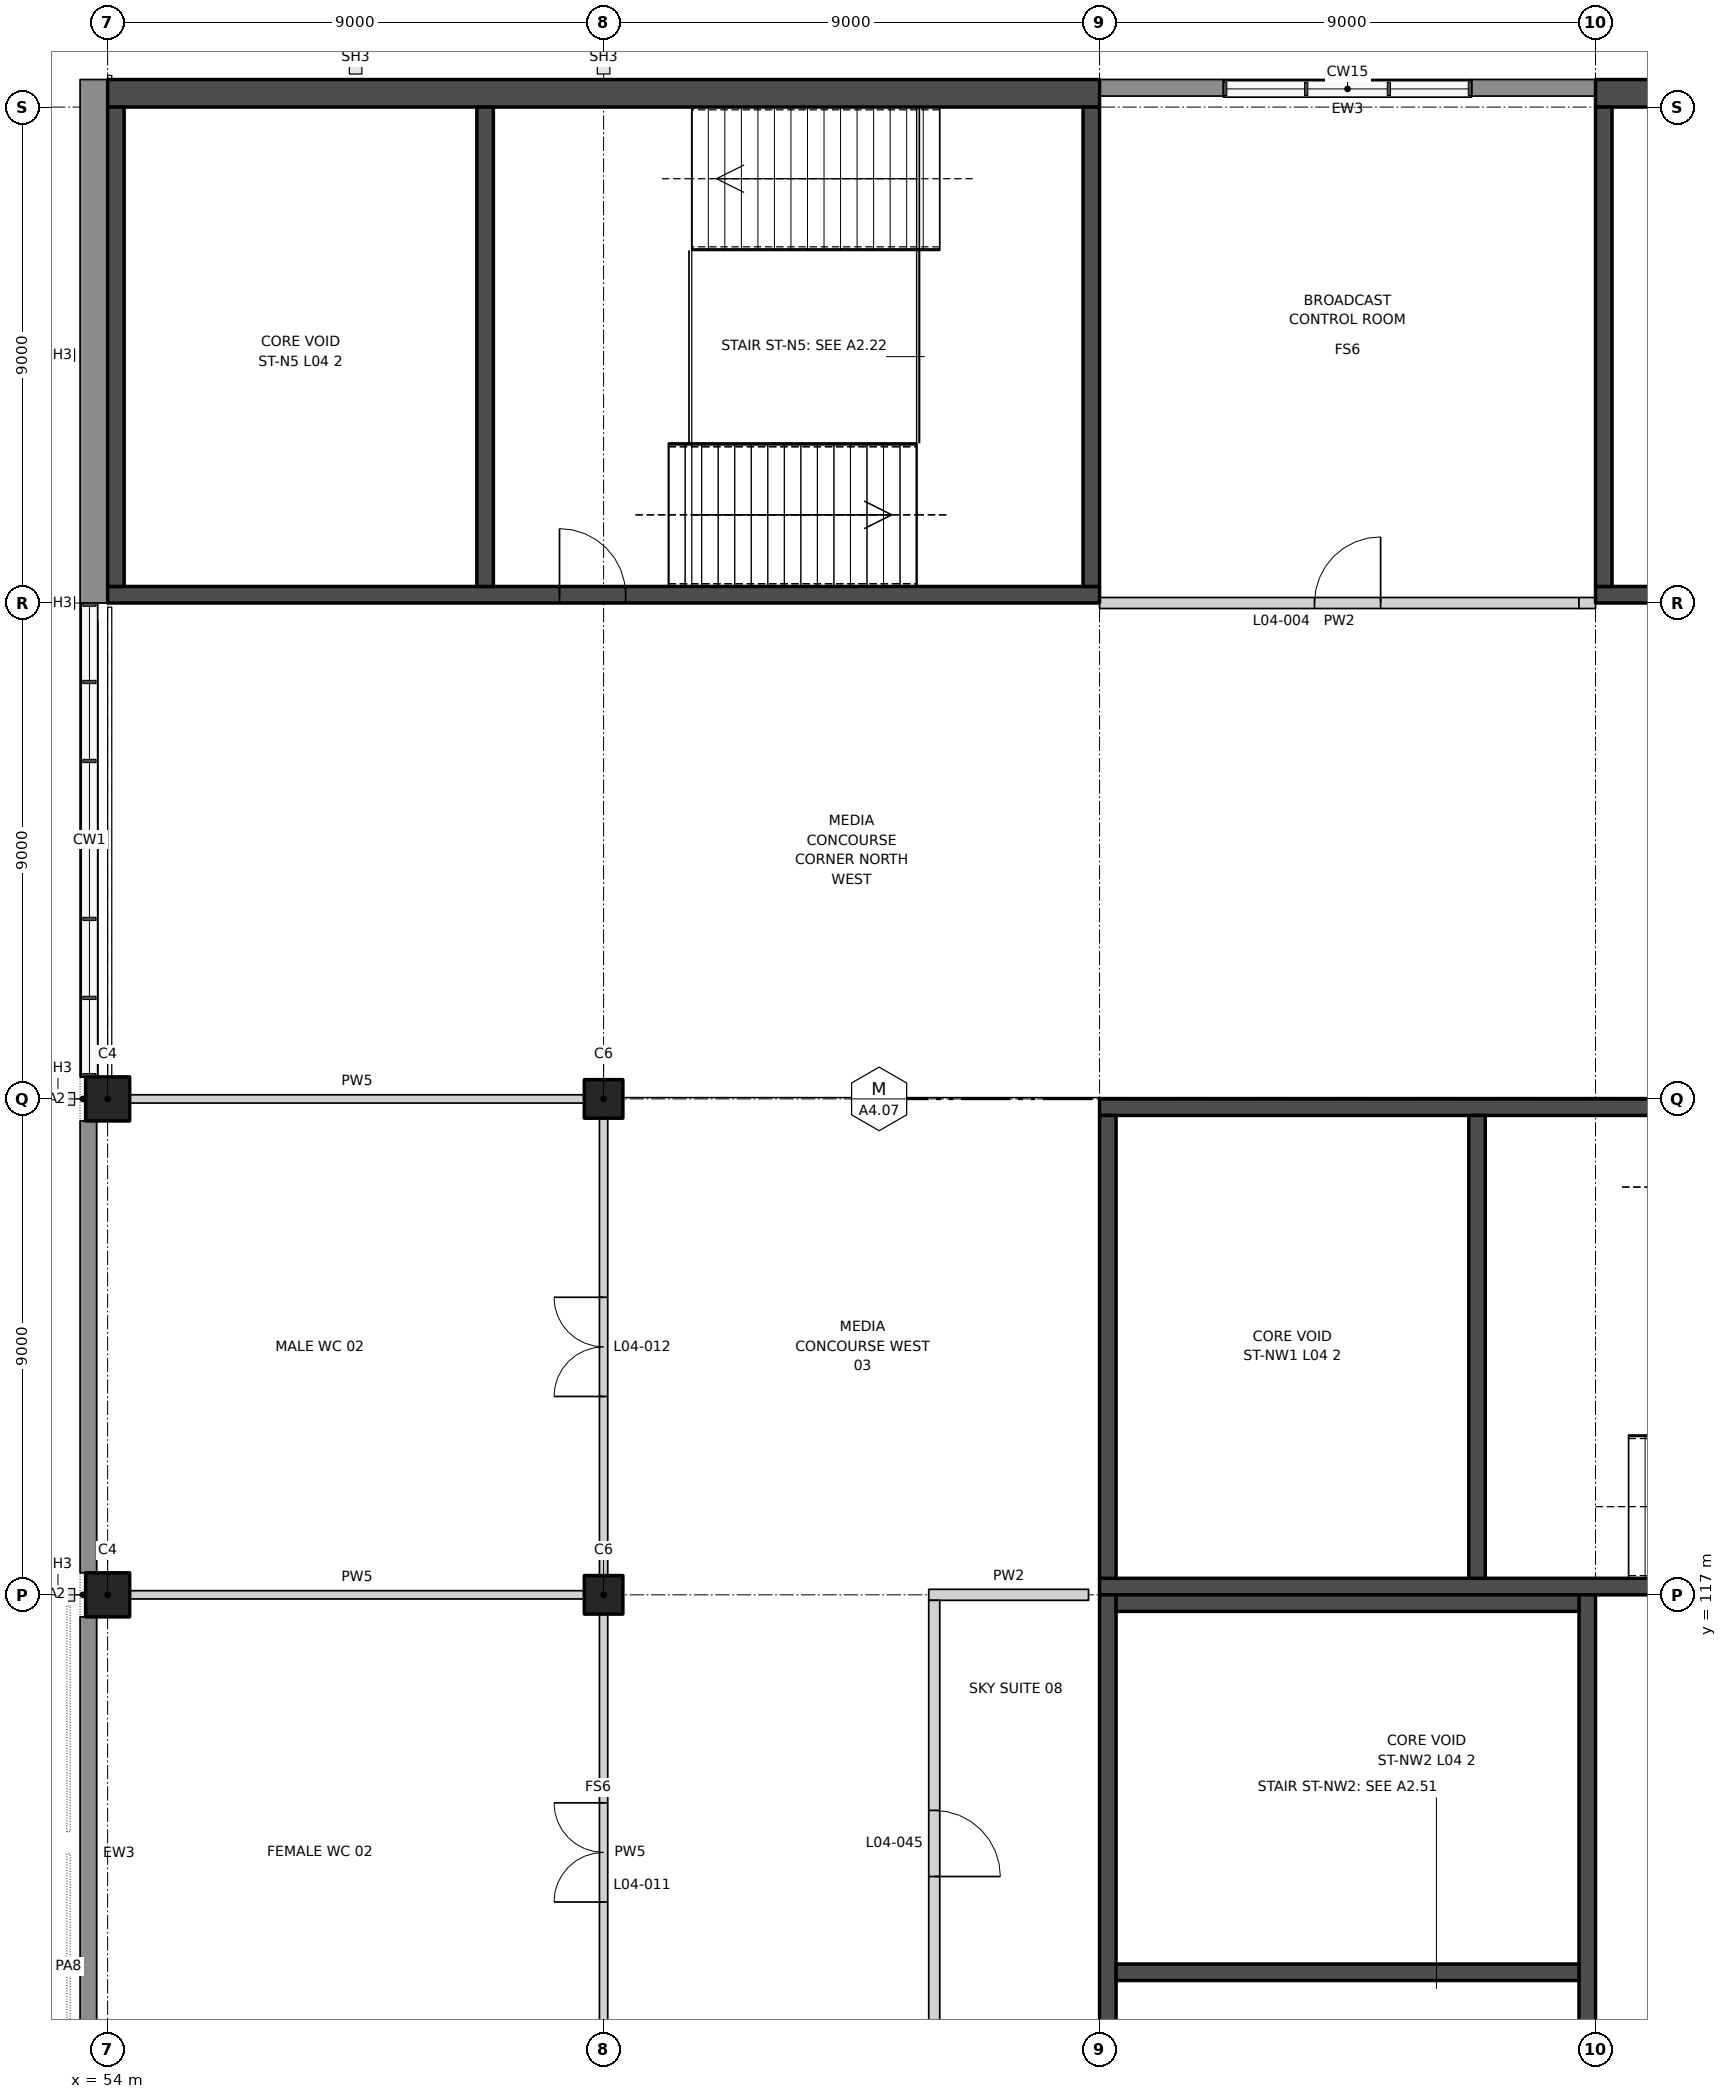
"""IFC4 building model, lengths in metres.
Left out: names, types, materials, properties, quantities, classifications, styles, units other than length and angle.
Written with IfcOpenShell. Run it as: python <this file> out.ifc"""

import sys

from ifc_helpers import new_model, si_unit, direction, frame, frame_2d, origin, origin_2d, place, context, subcontext, project, spatial, rectangle, extrude, element, fill, save


model = new_model("IFC4")
c1 = context("Model", 3, precision=1e-05, world=origin(), true_north=direction((0.0, 1.0)))
c2 = subcontext(c1, "Body", "Model", "MODEL_VIEW")
j1 = project(units=[si_unit("LENGTHUNIT", "METRE"), si_unit("PLANEANGLEUNIT", "RADIAN")], contexts=[c1])
p1 = place(None, origin())
s1 = spatial("IfcSite", under=j1, at=p1, CompositionType="ELEMENT")
p2 = place(p1, origin())
s2 = spatial("IfcBuilding", under=s1, at=p2, CompositionType="ELEMENT")
p3 = place(p2, frame((0.0, 0.0, 28.0)))
s3 = spatial("IfcBuildingStorey", under=s2, at=p3, CompositionType="ELEMENT", Elevation=28.0)
for number, where, z_axis, x_axis in (
    (1, (54.0, 117.0, 0.0), (0.0, 0.0, 1.0), (1.0, 0.0, 0.0)),
    (2, (54.0, 126.0, 0.0), (0.0, 0.0, 1.0), (1.0, 0.0, 0.0)),
):
    element("IfcColumn", number, at=place(p3, frame(where, z_axis=z_axis, x_axis=x_axis)), inside=s3, PredefinedType="COLUMN", context=c2, shape_type="SweptSolid", body=[
        extrude(rectangle(XDim=0.8, YDim=0.8, at=origin_2d()), origin(), (0.0, 0.0, 1.0), 5.5),
    ])
for number, where, z_axis, x_axis in (
    (3, (63.0, 117.0, 0.0), (0.0, 0.0, 1.0), (1.0, 0.0, 0.0)),
    (4, (63.0, 126.0, 0.0), (0.0, 0.0, 1.0), (1.0, 0.0, 0.0)),
):
    element("IfcColumn", number, at=place(p3, frame(where, z_axis=z_axis, x_axis=x_axis)), inside=s3, PredefinedType="COLUMN", context=c2, shape_type="SweptSolid", body=[
        extrude(rectangle(XDim=0.7, YDim=0.7, at=origin_2d()), origin(), (0.0, 0.0, 1.0), 5.5),
    ])
p4 = place(p3, frame((54.4, 117.0, 0.0), z_axis=(0.0, 0.0, 1.0), x_axis=(1.0, 0.0, 0.0)))
e5 = element("IfcWall", 5, at=p4, inside=s3, PredefinedType="PARTITIONING", context=c2, shape_type="SweptSolid", body=[
    extrude(rectangle(XDim=8.25, YDim=0.15, at=frame_2d((4.125, 0.0))), origin(), (0.0, 0.0, 1.0), 9.5),
])
p5 = place(p3, frame((68.9, 117.0, 0.0), z_axis=(0.0, 0.0, 1.0), x_axis=(1.0, 0.0, 0.0)))
e6 = element("IfcWall", 6, at=p5, inside=s3, PredefinedType="PARTITIONING", context=c2, shape_type="SweptSolid", body=[
    extrude(rectangle(XDim=2.9, YDim=0.2, at=frame_2d((1.45, 0.0))), origin(), (0.0, 0.0, 1.0), 4.2),
])
p6 = place(p3, frame((54.4, 126.0, 0.0), z_axis=(0.0, 0.0, 1.0), x_axis=(1.0, 0.0, 0.0)))
e7 = element("IfcWall", 7, at=p6, inside=s3, PredefinedType="PARTITIONING", context=c2, shape_type="SweptSolid", body=[
    extrude(rectangle(XDim=8.25, YDim=0.15, at=frame_2d((4.125, 0.0))), origin(), (0.0, 0.0, 1.0), 4.3),
])
p7 = place(p3, frame((72.0, 135.0, 0.0), z_axis=(0.0, 0.0, 1.0), x_axis=(1.0, 0.0, 0.0)))
e8 = element("IfcWall", 8, at=p7, inside=s3, PredefinedType="PARTITIONING", context=c2, shape_type="SweptSolid", body=[
    extrude(rectangle(XDim=8.7, YDim=0.2, at=frame_2d((4.35, 0.0))), origin(), (0.0, 0.0, 1.0), 4.2),
])
p8 = place(p7, frame((3.9, 0.0, 0.0)))
e9 = element("IfcOpeningElement", 9, at=p8, cuts=e8, PredefinedType="OPENING", context=c2, shape_type="SweptSolid", body=[
    extrude(rectangle(XDim=1.2, YDim=2.1, at=frame_2d((0.6, 1.05))), frame((0.0, 0.11, 0.0), z_axis=(0.0, -1.0, 0.0), x_axis=(1.0, 0.0, 0.0)), (0.0, 0.0, 1.0), 0.22),
])
p9 = place(p3, frame((63.0, 108.0, 0.0), z_axis=(0.0, 0.0, 1.0), x_axis=(0.0, 1.0, 0.0)))
e10 = element("IfcWall", 10, at=p9, inside=s3, PredefinedType="PARTITIONING", context=c2, shape_type="SweptSolid", body=[
    extrude(rectangle(XDim=8.65, YDim=0.15, at=frame_2d((4.325, 0.0))), origin(), (0.0, 0.0, 1.0), 4.2),
])
p10 = place(p9, frame((3.425, 0.0, 0.0)))
e11 = element("IfcOpeningElement", 11, at=p10, cuts=e10, PredefinedType="OPENING", context=c2, shape_type="SweptSolid", body=[
    extrude(rectangle(XDim=1.8, YDim=2.1, at=frame_2d((0.9, 1.05))), frame((0.0, 0.085, 0.0), z_axis=(0.0, -1.0, 0.0), x_axis=(1.0, 0.0, 0.0)), (0.0, 0.0, 1.0), 0.17),
])
p11 = place(p3, frame((63.0, 117.35, 0.0), z_axis=(0.0, 0.0, 1.0), x_axis=(0.0, 1.0, 0.0)))
e12 = element("IfcWall", 12, at=p11, inside=s3, PredefinedType="PARTITIONING", context=c2, shape_type="SweptSolid", body=[
    extrude(rectangle(XDim=8.3, YDim=0.15, at=frame_2d((4.15, 0.0))), origin(), (0.0, 0.0, 1.0), 4.2),
])
p12 = place(p11, frame((3.25, 0.0, 0.0)))
e13 = element("IfcOpeningElement", 13, at=p12, cuts=e12, PredefinedType="OPENING", context=c2, shape_type="SweptSolid", body=[
    extrude(rectangle(XDim=1.8, YDim=2.1, at=frame_2d((0.9, 1.05))), frame((0.0, 0.085, 0.0), z_axis=(0.0, -1.0, 0.0), x_axis=(1.0, 0.0, 0.0)), (0.0, 0.0, 1.0), 0.17),
])
p13 = place(p3, frame((69.0, 108.075, 0.0), z_axis=(0.0, 0.0, 1.0), x_axis=(0.0, 1.0, 0.0)))
e14 = element("IfcWall", 14, at=p13, inside=s3, PredefinedType="PARTITIONING", context=c2, shape_type="SweptSolid", body=[
    extrude(rectangle(XDim=8.825, YDim=0.2, at=frame_2d((4.413, 0.0))), origin(), (0.0, 0.0, 1.0), 5.5),
])
p14 = place(p13, frame((3.813, 0.0, 0.0)))
e15 = element("IfcOpeningElement", 15, at=p14, cuts=e14, PredefinedType="OPENING", context=c2, shape_type="SweptSolid", body=[
    extrude(rectangle(XDim=1.2, YDim=2.1, at=frame_2d((0.6, 1.05))), frame((0.0, 0.11, 0.0), z_axis=(0.0, -1.0, 0.0), x_axis=(1.0, 0.0, 0.0)), (0.0, 0.0, 1.0), 0.22),
])
for number, where, z_axis, x_axis in (
    (16, (74.25, 144.35, 0.0), (0.0, 0.0, 1.0), (-1.0, 0.0, 0.0)),
    (17, (81.0, 144.35, 0.0), (0.0, 0.0, 1.0), (-1.0, 0.0, 0.0)),
):
    element("IfcWall", number, at=place(p3, frame(where, z_axis=z_axis, x_axis=x_axis)), inside=s3, PredefinedType="SOLIDWALL", context=c2, shape_type="SweptSolid", body=[
        extrude(rectangle(XDim=2.25, YDim=0.3, at=frame_2d((1.125, 0.0))), origin(), (0.0, 0.0, 1.0), 4.9),
    ])
p15 = place(p3, frame((78.75, 144.35, 0.0), z_axis=(0.0, 0.0, 1.0), x_axis=(-1.0, 0.0, 0.0)))
e18 = element("IfcWall", 18, at=p15, inside=s3, PredefinedType="SOLIDWALL", context=c2, shape_type="SweptSolid", body=[
    extrude(rectangle(XDim=4.5, YDim=0.3, at=frame_2d((2.25, 0.0))), origin(), (0.0, 0.0, 1.0), 1.0),
])
p16 = place(p3, frame((53.65, 116.6, 0.0), z_axis=(0.0, 0.0, 1.0), x_axis=(0.0, -1.0, 0.0)))
e19 = element("IfcWall", 19, at=p16, inside=s3, PredefinedType="SOLIDWALL", context=c2, shape_type="SweptSolid", body=[
    extrude(rectangle(XDim=8.6, YDim=0.3, at=frame_2d((4.3, 0.0))), origin(), (0.0, 0.0, 1.0), 5.5),
])
p17 = place(p3, frame((53.65, 125.6, 0.0), z_axis=(0.0, 0.0, 1.0), x_axis=(0.0, -1.0, 0.0)))
e20 = element("IfcWall", 20, at=p17, inside=s3, PredefinedType="SOLIDWALL", context=c2, shape_type="SweptSolid", body=[
    extrude(rectangle(XDim=8.2, YDim=0.3, at=frame_2d((4.1, 0.0))), origin(), (0.0, 0.0, 1.0), 5.5),
])
p18 = place(p3, frame((53.65, 135.0, 0.0), z_axis=(0.0, 0.0, 1.0), x_axis=(0.0, -1.0, 0.0)))
e21 = element("IfcWall", 21, at=p18, inside=s3, PredefinedType="SOLIDWALL", context=c2, shape_type="SweptSolid", body=[
    extrude(rectangle(XDim=8.6, YDim=0.3, at=frame_2d((4.3, 0.0))), origin(), (0.0, 0.0, 1.0), 1.0),
])
p19 = place(p3, frame((53.75, 144.5, 0.0), z_axis=(0.0, 0.0, 1.0), x_axis=(0.0, -1.0, 0.0)))
e22 = element("IfcWall", 22, at=p19, inside=s3, PredefinedType="SOLIDWALL", context=c2, shape_type="SweptSolid", body=[
    extrude(rectangle(XDim=9.5, YDim=0.5, at=frame_2d((4.75, 0.0))), origin(), (0.0, 0.0, 1.0), 5.5),
])
p20 = place(p3, frame((81.0, 135.15, 0.0), z_axis=(0.0, 0.0, 1.0), x_axis=(1.0, 0.0, 0.0)))
e23 = element("IfcWall", 23, at=p20, inside=s3, PredefinedType="SHEAR", context=c2, shape_type="SweptSolid", body=[
    extrude(rectangle(XDim=18.0, YDim=0.3, at=frame_2d((9.0, 0.0))), origin(), (0.0, 0.0, 1.0), 5.5),
])
p21 = place(p20, frame((8.6, 0.0, 0.0)))
e24 = element("IfcOpeningElement", 24, at=p21, cuts=e23, PredefinedType="OPENING", context=c2, shape_type="SweptSolid", body=[
    extrude(rectangle(XDim=1.2, YDim=2.1, at=frame_2d((0.6, 1.05))), frame((0.0, 0.16, 0.0), z_axis=(0.0, -1.0, 0.0), x_axis=(1.0, 0.0, 0.0)), (0.0, 0.0, 1.0), 0.32),
])
p22 = place(p3, frame((81.0, 144.25, 0.0), z_axis=(0.0, 0.0, 1.0), x_axis=(1.0, 0.0, 0.0)))
e25 = element("IfcWall", 25, at=p22, inside=s3, PredefinedType="SHEAR", context=c2, shape_type="SweptSolid", body=[
    extrude(rectangle(XDim=18.0, YDim=0.5, at=frame_2d((9.0, 0.0))), origin(), (0.0, 0.0, 1.0), 5.5),
])
p23 = place(p3, frame((81.15, 135.3, 0.0), z_axis=(0.0, 0.0, 1.0), x_axis=(0.0, 1.0, 0.0)))
e26 = element("IfcWall", 26, at=p23, inside=s3, PredefinedType="SHEAR", context=c2, shape_type="SweptSolid", body=[
    extrude(rectangle(XDim=8.7, YDim=0.3, at=frame_2d((4.35, 0.0))), origin(), (0.0, 0.0, 1.0), 5.5),
])
p24 = place(p3, frame((72.0, 135.15, 0.0), z_axis=(0.0, 0.0, 1.0), x_axis=(-1.0, 0.0, 0.0)))
e27 = element("IfcWall", 27, at=p24, inside=s3, PredefinedType="SHEAR", context=c2, shape_type="SweptSolid", body=[
    extrude(rectangle(XDim=18.0, YDim=0.3, at=frame_2d((9.0, 0.0))), origin(), (0.0, 0.0, 1.0), 5.5),
])
p25 = place(p24, frame((8.6, 0.0, 0.0)))
e28 = element("IfcOpeningElement", 28, at=p25, cuts=e27, PredefinedType="OPENING", context=c2, shape_type="SweptSolid", body=[
    extrude(rectangle(XDim=1.2, YDim=2.1, at=frame_2d((0.6, 1.05))), frame((0.0, 0.16, 0.0), z_axis=(0.0, -1.0, 0.0), x_axis=(1.0, 0.0, 0.0)), (0.0, 0.0, 1.0), 0.32),
])
p26 = place(p3, frame((72.0, 144.25, 0.0), z_axis=(0.0, 0.0, 1.0), x_axis=(-1.0, 0.0, 0.0)))
e29 = element("IfcWall", 29, at=p26, inside=s3, PredefinedType="SHEAR", context=c2, shape_type="SweptSolid", body=[
    extrude(rectangle(XDim=18.0, YDim=0.5, at=frame_2d((9.0, 0.0))), origin(), (0.0, 0.0, 1.0), 5.5),
])
for number, where, z_axis, x_axis in (
    (30, (71.85, 135.3, 0.0), (0.0, 0.0, 1.0), (0.0, 1.0, 0.0)),
    (31, (54.15, 135.3, 0.0), (0.0, 0.0, 1.0), (0.0, 1.0, 0.0)),
    (32, (60.85, 135.3, 0.0), (0.0, 0.0, 1.0), (0.0, 1.0, 0.0)),
):
    element("IfcWall", number, at=place(p3, frame(where, z_axis=z_axis, x_axis=x_axis)), inside=s3, PredefinedType="SHEAR", context=c2, shape_type="SweptSolid", body=[
        extrude(rectangle(XDim=8.7, YDim=0.3, at=frame_2d((4.35, 0.0))), origin(), (0.0, 0.0, 1.0), 5.5),
    ])
p27 = place(p3, frame((90.0, 117.15, 0.0), z_axis=(0.0, 0.0, 1.0), x_axis=(-1.0, 0.0, 0.0)))
e33 = element("IfcWall", 33, at=p27, inside=s3, PredefinedType="SHEAR", context=c2, shape_type="SweptSolid", body=[
    extrude(rectangle(XDim=18.0, YDim=0.3, at=frame_2d((9.0, 0.0))), origin(), (0.0, 0.0, 1.0), 5.5),
])
p28 = place(p27, frame((1.5, 0.0, 0.0)))
e34 = element("IfcOpeningElement", 34, at=p28, cuts=e33, PredefinedType="OPENING", context=c2, shape_type="SweptSolid", body=[
    extrude(rectangle(XDim=1.2, YDim=2.1, at=frame_2d((0.6, 1.05))), frame((0.0, 0.16, 0.0), z_axis=(0.0, -1.0, 0.0), x_axis=(1.0, 0.0, 0.0)), (0.0, 0.0, 1.0), 0.32),
])
p29 = place(p3, frame((90.0, 125.85, 0.0), z_axis=(0.0, 0.0, 1.0), x_axis=(-1.0, 0.0, 0.0)))
e35 = element("IfcWall", 35, at=p29, inside=s3, PredefinedType="SHEAR", context=c2, shape_type="SweptSolid", body=[
    extrude(rectangle(XDim=18.0, YDim=0.3, at=frame_2d((9.0, 0.0))), origin(), (0.0, 0.0, 1.0), 5.5),
])
for number, where, z_axis, x_axis in (
    (36, (72.15, 117.3, 0.0), (0.0, 0.0, 1.0), (0.0, 1.0, 0.0)),
    (37, (78.85, 117.3, 0.0), (0.0, 0.0, 1.0), (0.0, 1.0, 0.0)),
):
    element("IfcWall", number, at=place(p3, frame(where, z_axis=z_axis, x_axis=x_axis)), inside=s3, PredefinedType="SHEAR", context=c2, shape_type="SweptSolid", body=[
        extrude(rectangle(XDim=8.4, YDim=0.3, at=frame_2d((4.2, 0.0))), origin(), (0.0, 0.0, 1.0), 5.5),
    ])
p30 = place(p3, frame((80.85, 99.0, 0.0), z_axis=(0.0, 0.0, 1.0), x_axis=(0.0, 1.0, 0.0)))
e38 = element("IfcWall", 38, at=p30, inside=s3, PredefinedType="SHEAR", context=c2, shape_type="SweptSolid", body=[
    extrude(rectangle(XDim=18.0, YDim=0.3, at=frame_2d((9.0, 0.0))), origin(), (0.0, 0.0, 1.0), 5.5),
])
p31 = place(p30, frame((1.5, 0.0, 0.0)))
e39 = element("IfcOpeningElement", 39, at=p31, cuts=e38, PredefinedType="OPENING", context=c2, shape_type="SweptSolid", body=[
    extrude(rectangle(XDim=1.2, YDim=2.1, at=frame_2d((0.6, 1.05))), frame((0.0, 0.16, 0.0), z_axis=(0.0, -1.0, 0.0), x_axis=(1.0, 0.0, 0.0)), (0.0, 0.0, 1.0), 0.32),
])
p32 = place(p3, frame((72.15, 99.0, 0.0), z_axis=(0.0, 0.0, 1.0), x_axis=(0.0, 1.0, 0.0)))
e40 = element("IfcWall", 40, at=p32, inside=s3, PredefinedType="SHEAR", context=c2, shape_type="SweptSolid", body=[
    extrude(rectangle(XDim=18.0, YDim=0.3, at=frame_2d((9.0, 0.0))), origin(), (0.0, 0.0, 1.0), 5.5),
])
for number, where, z_axis, x_axis in (
    (41, (80.7, 116.85, 0.0), (0.0, 0.0, 1.0), (-1.0, 0.0, 0.0)),
    (42, (80.7, 110.15, 0.0), (0.0, 0.0, 1.0), (-1.0, 0.0, 0.0)),
):
    element("IfcWall", number, at=place(p3, frame(where, z_axis=z_axis, x_axis=x_axis)), inside=s3, PredefinedType="SHEAR", context=c2, shape_type="SweptSolid", body=[
        extrude(rectangle(XDim=8.4, YDim=0.3, at=frame_2d((4.2, 0.0))), origin(), (0.0, 0.0, 1.0), 5.5),
    ])
p33 = place(p3, frame((80.7, 135.0, 0.0), z_axis=(0.0, 0.0, 1.0), x_axis=(1.0, 0.0, 0.0)))
e43 = element("IfcWall", 43, at=p33, inside=s3, PredefinedType="PARTITIONING", context=c2, shape_type="SweptSolid", body=[
    extrude(rectangle(XDim=0.3, YDim=0.2, at=frame_2d((0.15, 0.0))), origin(), (0.0, 0.0, 1.0), 5.5),
])
p34 = place(p8, origin())
e44 = element("IfcDoor", 44, at=p34, inside=s3, OperationType="SINGLE_SWING_RIGHT", PredefinedType="DOOR", context=c2, shape_type="SweptSolid", body=[
    extrude(rectangle(XDim=1.2, YDim=2.1, at=frame_2d((0.6, 1.05))), frame((0.0, 0.025, 0.0), z_axis=(0.0, -1.0, 0.0), x_axis=(1.0, 0.0, 0.0)), (0.0, 0.0, 1.0), 0.05),
])
fill(e9, e44)
p35 = place(p10, origin())
e45 = element("IfcDoor", 45, at=p35, inside=s3, OperationType="DOUBLE_DOOR_DOUBLE_SWING", PredefinedType="DOOR", context=c2, shape_type="SweptSolid", body=[
    extrude(rectangle(XDim=1.8, YDim=2.1, at=frame_2d((0.9, 1.05))), frame((0.0, 0.025, 0.0), z_axis=(0.0, -1.0, 0.0), x_axis=(1.0, 0.0, 0.0)), (0.0, 0.0, 1.0), 0.05),
])
fill(e11, e45)
p36 = place(p12, origin())
e46 = element("IfcDoor", 46, at=p36, inside=s3, OperationType="DOUBLE_DOOR_DOUBLE_SWING", PredefinedType="DOOR", context=c2, shape_type="SweptSolid", body=[
    extrude(rectangle(XDim=1.8, YDim=2.1, at=frame_2d((0.9, 1.05))), frame((0.0, 0.025, 0.0), z_axis=(0.0, -1.0, 0.0), x_axis=(1.0, 0.0, 0.0)), (0.0, 0.0, 1.0), 0.05),
])
fill(e13, e46)
p37 = place(p14, frame((1.2, 0.0, 0.0), z_axis=(0.0, 0.0, 1.0), x_axis=(-1.0, 0.0, 0.0)))
e47 = element("IfcDoor", 47, at=p37, inside=s3, OperationType="SINGLE_SWING_RIGHT", PredefinedType="DOOR", context=c2, shape_type="SweptSolid", body=[
    extrude(rectangle(XDim=1.2, YDim=2.1, at=frame_2d((0.6, 1.05))), frame((0.0, 0.025, 0.0), z_axis=(0.0, -1.0, 0.0), x_axis=(1.0, 0.0, 0.0)), (0.0, 0.0, 1.0), 0.05),
])
fill(e15, e47)
p38 = place(p25, frame((1.2, 0.0, 0.0), z_axis=(0.0, 0.0, 1.0), x_axis=(-1.0, 0.0, 0.0)))
e48 = element("IfcDoor", 48, at=p38, inside=s3, OperationType="SINGLE_SWING_LEFT", PredefinedType="DOOR", context=c2, shape_type="SweptSolid", body=[
    extrude(rectangle(XDim=1.2, YDim=2.1, at=frame_2d((0.6, 1.05))), frame((0.0, 0.025, 0.0), z_axis=(0.0, -1.0, 0.0), x_axis=(1.0, 0.0, 0.0)), (0.0, 0.0, 1.0), 0.05),
])
fill(e28, e48)
save(model, sys.argv[1])
